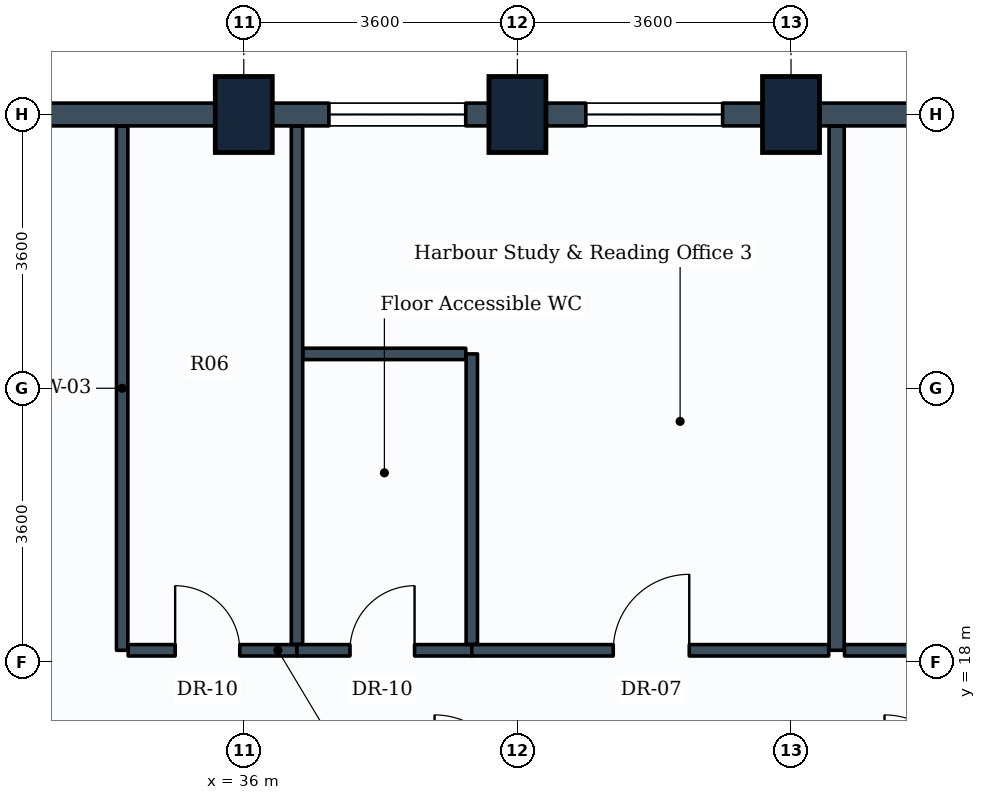
"""IFC4 building model, lengths in metres.
Left out: names, types, materials, properties, quantities, classifications, styles, units other than length and angle.
Written with IfcOpenShell. Run it as: python <this file> out.ifc"""

import sys

from ifc_helpers import new_model, si_unit, direction, frame, frame_2d, origin, origin_2d, place, context, subcontext, project, spatial, rectangle, extrude, element, fill, save


model = new_model("IFC4")
c1 = context("Model", 3, precision=1e-05, world=origin(), true_north=direction((0.0, 1.0)))
c2 = subcontext(c1, "Body", "Model", "MODEL_VIEW")
j1 = project(units=[si_unit("LENGTHUNIT", "METRE"), si_unit("PLANEANGLEUNIT", "RADIAN")], contexts=[c1])
p1 = place(None, origin())
s1 = spatial("IfcSite", under=j1, at=p1, CompositionType="ELEMENT")
p2 = place(p1, origin())
s2 = spatial("IfcBuilding", under=s1, at=p2, CompositionType="ELEMENT")
p3 = place(p2, frame((0.0, 0.0, 135.2)))
s3 = spatial("IfcBuildingStorey", under=s2, at=p3, CompositionType="ELEMENT", Elevation=135.2)
for number, where, z_axis, x_axis in (
    (1, (36.0, 25.2, 0.0), (0.0, 0.0, 1.0), (1.0, 0.0, 0.0)),
    (2, (39.6, 25.2, 0.0), (0.0, 0.0, 1.0), (1.0, 0.0, 0.0)),
    (3, (43.2, 25.2, 0.0), (0.0, 0.0, 1.0), (1.0, 0.0, 0.0)),
):
    element("IfcColumn", number, at=place(p3, frame(where, z_axis=z_axis, x_axis=x_axis)), inside=s3, PredefinedType="COLUMN", context=c2, shape_type="SweptSolid", body=[
        extrude(rectangle(XDim=0.75, YDim=1.0, at=origin_2d()), origin(), (0.0, 0.0, 1.0), 3.8),
    ])
p4 = place(p3, frame((43.2, 25.2, 0.0), z_axis=(0.0, 0.0, 1.0), x_axis=(1.0, 0.0, 0.0)))
e4 = element("IfcWall", 4, at=p4, inside=s3, PredefinedType="STANDARD", context=c2, shape_type="SweptSolid", body=[
    extrude(rectangle(XDim=3.6, YDim=0.3, at=frame_2d((1.8, 0.0))), origin(), (0.0, 0.0, 1.0), 2.93),
])
p5 = place(p3, frame((39.6, 25.2, 0.0), z_axis=(0.0, 0.0, 1.0), x_axis=(1.0, 0.0, 0.0)))
e5 = element("IfcWall", 5, at=p5, inside=s3, PredefinedType="STANDARD", context=c2, shape_type="SweptSolid", body=[
    extrude(rectangle(XDim=3.6, YDim=0.3, at=frame_2d((1.8, 0.0))), origin(), (0.0, 0.0, 1.0), 2.93),
])
p6 = place(p5, frame((0.9, 0.0, 0.85)))
e6 = element("IfcOpeningElement", 6, at=p6, cuts=e5, PredefinedType="OPENING", context=c2, shape_type="SweptSolid", body=[
    extrude(rectangle(XDim=1.8, YDim=1.35, at=frame_2d((0.9, 0.675))), frame((0.0, 0.16, 0.0), z_axis=(0.0, -1.0, 0.0), x_axis=(1.0, 0.0, 0.0)), (0.0, 0.0, 1.0), 0.32),
])
p7 = place(p3, frame((36.0, 25.2, 0.0), z_axis=(0.0, 0.0, 1.0), x_axis=(1.0, 0.0, 0.0)))
e7 = element("IfcWall", 7, at=p7, inside=s3, PredefinedType="STANDARD", context=c2, shape_type="SweptSolid", body=[
    extrude(rectangle(XDim=3.6, YDim=0.3, at=frame_2d((1.8, 0.0))), origin(), (0.0, 0.0, 1.0), 2.93),
])
p8 = place(p7, frame((1.12, 0.0, 0.85)))
e8 = element("IfcOpeningElement", 8, at=p8, cuts=e7, PredefinedType="OPENING", context=c2, shape_type="SweptSolid", body=[
    extrude(rectangle(XDim=1.8, YDim=1.35, at=frame_2d((0.9, 0.675))), frame((0.0, 0.16, 0.0), z_axis=(0.0, -1.0, 0.0), x_axis=(1.0, 0.0, 0.0)), (0.0, 0.0, 1.0), 0.32),
])
p9 = place(p3, frame((32.4, 25.2, 0.0), z_axis=(0.0, 0.0, 1.0), x_axis=(1.0, 0.0, 0.0)))
e9 = element("IfcWall", 9, at=p9, inside=s3, PredefinedType="STANDARD", context=c2, shape_type="SweptSolid", body=[
    extrude(rectangle(XDim=3.6, YDim=0.3, at=frame_2d((1.8, 0.0))), origin(), (0.0, 0.0, 1.0), 2.93),
])
p10 = place(p3, frame((34.4, 18.15, 0.0), z_axis=(0.0, 0.0, 1.0), x_axis=(0.0, 1.0, 0.0)))
e10 = element("IfcWall", 10, at=p10, inside=s3, PredefinedType="PARTITIONING", context=c2, shape_type="SweptSolid", body=[
    extrude(rectangle(XDim=6.896, YDim=0.15, at=frame_2d((3.448, 0.0))), origin(), (0.0, 0.0, 1.0), 2.93),
])
p11 = place(p3, frame((34.479, 18.15, 0.0), z_axis=(0.0, 0.0, 1.0), x_axis=(1.0, 0.0, 0.0)))
e11 = element("IfcWall", 11, at=p11, inside=s3, PredefinedType="PARTITIONING", context=c2, shape_type="SweptSolid", body=[
    extrude(rectangle(XDim=2.221, YDim=0.15, at=frame_2d((1.11, 0.0))), origin(), (0.0, 0.0, 1.0), 3.08),
])
p12 = place(p11, frame((0.618, 0.0, 0.0)))
e12 = element("IfcOpeningElement", 12, at=p12, cuts=e11, PredefinedType="OPENING", context=c2, shape_type="SweptSolid", body=[
    extrude(rectangle(XDim=0.85, YDim=2.1, at=frame_2d((0.425, 1.05))), frame((0.0, 0.085, 0.0), z_axis=(0.0, -1.0, 0.0), x_axis=(1.0, 0.0, 0.0)), (0.0, 0.0, 1.0), 0.17),
])
p13 = place(p3, frame((36.7, 18.229, 0.0), z_axis=(0.0, 0.0, 1.0), x_axis=(0.0, 1.0, 0.0)))
e13 = element("IfcWall", 13, at=p13, inside=s3, PredefinedType="PARTITIONING", context=c2, shape_type="SweptSolid", body=[
    extrude(rectangle(XDim=6.817, YDim=0.15, at=frame_2d((3.408, 0.0))), origin(), (0.0, 0.0, 1.0), 2.93),
])
p14 = place(p3, frame((36.7, 18.15, 0.0), z_axis=(0.0, 0.0, 1.0), x_axis=(1.0, 0.0, 0.0)))
e14 = element("IfcWall", 14, at=p14, inside=s3, PredefinedType="PARTITIONING", context=c2, shape_type="SweptSolid", body=[
    extrude(rectangle(XDim=2.3, YDim=0.15, at=frame_2d((1.15, 0.0))), origin(), (0.0, 0.0, 1.0), 3.08),
])
p15 = place(p14, frame((0.697, 0.0, 0.0)))
e15 = element("IfcOpeningElement", 15, at=p15, cuts=e14, PredefinedType="OPENING", context=c2, shape_type="SweptSolid", body=[
    extrude(rectangle(XDim=0.85, YDim=2.1, at=frame_2d((0.425, 1.05))), frame((0.0, 0.085, 0.0), z_axis=(0.0, -1.0, 0.0), x_axis=(1.0, 0.0, 0.0)), (0.0, 0.0, 1.0), 0.17),
])
p16 = place(p3, frame((39.0, 18.229, 0.0), z_axis=(0.0, 0.0, 1.0), x_axis=(0.0, 1.0, 0.0)))
e16 = element("IfcWall", 16, at=p16, inside=s3, PredefinedType="PARTITIONING", context=c2, shape_type="SweptSolid", body=[
    extrude(rectangle(XDim=3.821, YDim=0.15, at=frame_2d((1.911, 0.0))), origin(), (0.0, 0.0, 1.0), 3.08),
])
p17 = place(p3, frame((36.779, 22.05, 0.0), z_axis=(0.0, 0.0, 1.0), x_axis=(1.0, 0.0, 0.0)))
e17 = element("IfcWall", 17, at=p17, inside=s3, PredefinedType="PARTITIONING", context=c2, shape_type="SweptSolid", body=[
    extrude(rectangle(XDim=2.142, YDim=0.15, at=frame_2d((1.071, 0.0))), origin(), (0.0, 0.0, 1.0), 3.535),
])
p18 = place(p3, frame((43.8, 18.15, 0.0), z_axis=(0.0, 0.0, 1.0), x_axis=(0.0, 1.0, 0.0)))
e18 = element("IfcWall", 18, at=p18, inside=s3, PredefinedType="PARTITIONING", context=c2, shape_type="SweptSolid", body=[
    extrude(rectangle(XDim=6.896, YDim=0.2, at=frame_2d((3.448, 0.0))), origin(), (0.0, 0.0, 1.0), 2.93),
])
p19 = place(p3, frame((39.0, 18.15, 0.0), z_axis=(0.0, 0.0, 1.0), x_axis=(1.0, 0.0, 0.0)))
e19 = element("IfcWall", 19, at=p19, inside=s3, PredefinedType="PARTITIONING", context=c2, shape_type="SweptSolid", body=[
    extrude(rectangle(XDim=4.696, YDim=0.15, at=frame_2d((2.348, 0.0))), origin(), (0.0, 0.0, 1.0), 3.08),
])
p20 = place(p19, frame((1.861, 0.0, 0.0)))
e20 = element("IfcOpeningElement", 20, at=p20, cuts=e19, PredefinedType="OPENING", context=c2, shape_type="SweptSolid", body=[
    extrude(rectangle(XDim=1.0, YDim=2.1, at=frame_2d((0.5, 1.05))), frame((0.0, 0.085, 0.0), z_axis=(0.0, -1.0, 0.0), x_axis=(1.0, 0.0, 0.0)), (0.0, 0.0, 1.0), 0.17),
])
p21 = place(p3, frame((43.904, 18.15, 0.0), z_axis=(0.0, 0.0, 1.0), x_axis=(1.0, 0.0, 0.0)))
e21 = element("IfcWall", 21, at=p21, inside=s3, PredefinedType="PARTITIONING", context=c2, shape_type="SweptSolid", body=[
    extrude(rectangle(XDim=4.696, YDim=0.15, at=frame_2d((2.348, 0.0))), origin(), (0.0, 0.0, 1.0), 3.17),
])
p22 = place(p21, frame((1.757, 0.0, 0.0)))
e22 = element("IfcOpeningElement", 22, at=p22, cuts=e21, PredefinedType="OPENING", context=c2, shape_type="SweptSolid", body=[
    extrude(rectangle(XDim=1.0, YDim=2.1, at=frame_2d((0.5, 1.05))), frame((0.0, 0.085, 0.0), z_axis=(0.0, -1.0, 0.0), x_axis=(1.0, 0.0, 0.0)), (0.0, 0.0, 1.0), 0.17),
])
p23 = place(p6, origin())
e23 = element("IfcWindow", 23, at=p23, inside=s3, PartitioningType="SINGLE_PANEL", PredefinedType="WINDOW", context=c2, shape_type="SweptSolid", body=[
    extrude(rectangle(XDim=1.8, YDim=1.35, at=frame_2d((0.9, 0.675))), frame((0.0, 0.03, 0.0), z_axis=(0.0, -1.0, 0.0), x_axis=(1.0, 0.0, 0.0)), (0.0, 0.0, 1.0), 0.06),
])
fill(e6, e23)
p24 = place(p8, origin())
e24 = element("IfcWindow", 24, at=p24, inside=s3, PartitioningType="SINGLE_PANEL", PredefinedType="WINDOW", context=c2, shape_type="SweptSolid", body=[
    extrude(rectangle(XDim=1.8, YDim=1.35, at=frame_2d((0.9, 0.675))), frame((0.0, 0.03, 0.0), z_axis=(0.0, -1.0, 0.0), x_axis=(1.0, 0.0, 0.0)), (0.0, 0.0, 1.0), 0.06),
])
fill(e8, e24)
p25 = place(p12, origin())
e25 = element("IfcDoor", 25, at=p25, inside=s3, OperationType="SINGLE_SWING_LEFT", PredefinedType="DOOR", context=c2, shape_type="SweptSolid", body=[
    extrude(rectangle(XDim=0.85, YDim=2.1, at=frame_2d((0.425, 1.05))), frame((0.0, 0.025, 0.0), z_axis=(0.0, -1.0, 0.0), x_axis=(1.0, 0.0, 0.0)), (0.0, 0.0, 1.0), 0.05),
])
fill(e12, e25)
p26 = place(p15, origin())
e26 = element("IfcDoor", 26, at=p26, inside=s3, OperationType="SINGLE_SWING_RIGHT", PredefinedType="DOOR", context=c2, shape_type="SweptSolid", body=[
    extrude(rectangle(XDim=0.85, YDim=2.1, at=frame_2d((0.425, 1.05))), frame((0.0, 0.025, 0.0), z_axis=(0.0, -1.0, 0.0), x_axis=(1.0, 0.0, 0.0)), (0.0, 0.0, 1.0), 0.05),
])
fill(e15, e26)
p27 = place(p20, origin())
e27 = element("IfcDoor", 27, at=p27, inside=s3, OperationType="SINGLE_SWING_RIGHT", PredefinedType="DOOR", context=c2, shape_type="SweptSolid", body=[
    extrude(rectangle(XDim=1.0, YDim=2.1, at=frame_2d((0.5, 1.05))), frame((0.0, 0.025, 0.0), z_axis=(0.0, -1.0, 0.0), x_axis=(1.0, 0.0, 0.0)), (0.0, 0.0, 1.0), 0.05),
])
fill(e20, e27)
save(model, sys.argv[1])
